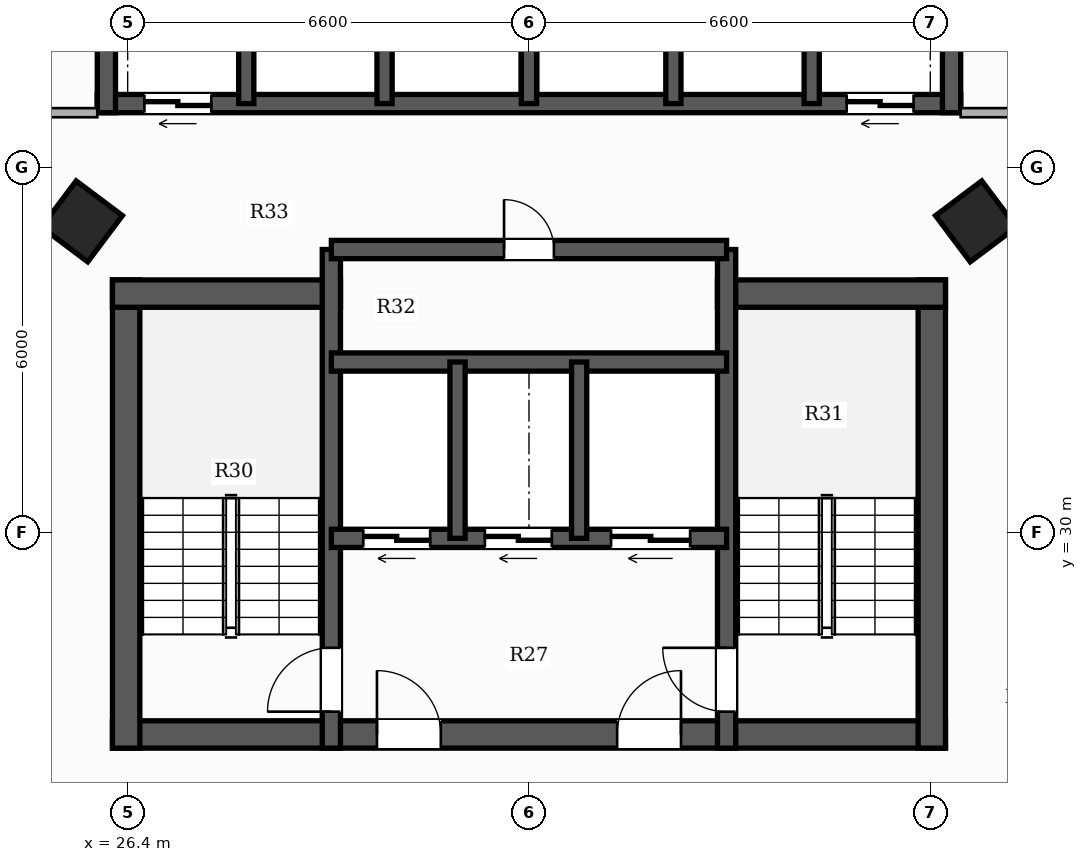
"""IFC4 building model, lengths in metres.
Left out: names, types, materials, properties, quantities, classifications, styles, units other than length and angle.
Written with IfcOpenShell. Run it as: python <this file> out.ifc"""

import sys

from ifc_helpers import new_model, si_unit, direction, frame, frame_2d, origin, origin_2d, place, context, subcontext, project, spatial, rectangle, hollow_rectangle, extrude, element, fill, save


model = new_model("IFC4")
c1 = context("Model", 3, precision=1e-05, world=origin(), true_north=direction((0.0, 1.0)))
c2 = subcontext(c1, "Body", "Model", "MODEL_VIEW")
j1 = project(units=[si_unit("LENGTHUNIT", "METRE"), si_unit("PLANEANGLEUNIT", "RADIAN")], contexts=[c1])
p1 = place(None, origin())
s1 = spatial("IfcSite", under=j1, at=p1, CompositionType="ELEMENT")
p2 = place(p1, origin())
s2 = spatial("IfcBuilding", under=s1, at=p2, CompositionType="ELEMENT")
p3 = place(p2, frame((0.0, 0.0, 26.9)))
s3 = spatial("IfcBuildingStorey", under=s2, at=p3, CompositionType="ELEMENT", Elevation=26.9)
p4 = place(p3, frame((26.15, 26.675, 0.0), z_axis=(0.0, 0.0, 1.0), x_axis=(1.0, 0.0, 0.0)))
e1 = element("IfcWall", 1, at=p4, inside=s3, PredefinedType="SHEAR", context=c2, shape_type="SweptSolid", body=[
    extrude(rectangle(XDim=13.7, YDim=0.45, at=frame_2d((6.85, 0.0))), origin(), (0.0, 0.0, 1.0), 3.3),
])
p5 = place(p4, frame((4.35, 0.0, 0.0)))
e2 = element("IfcOpeningElement", 2, at=p5, cuts=e1, PredefinedType="OPENING", context=c2, shape_type="SweptSolid", body=[
    extrude(rectangle(XDim=1.05, YDim=2.15, at=frame_2d((0.525, 1.075))), frame((0.0, 0.235, 0.0), z_axis=(0.0, -1.0, 0.0), x_axis=(1.0, 0.0, 0.0)), (0.0, 0.0, 1.0), 0.47),
])
p6 = place(p4, frame((8.3, 0.0, 0.0)))
e3 = element("IfcOpeningElement", 3, at=p6, cuts=e1, PredefinedType="OPENING", context=c2, shape_type="SweptSolid", body=[
    extrude(rectangle(XDim=1.05, YDim=2.15, at=frame_2d((0.525, 1.075))), frame((0.0, 0.235, 0.0), z_axis=(0.0, -1.0, 0.0), x_axis=(1.0, 0.0, 0.0)), (0.0, 0.0, 1.0), 0.47),
])
p7 = place(p3, frame((26.375, 26.45, 0.0), z_axis=(0.0, 0.0, 1.0), x_axis=(0.0, 1.0, 0.0)))
e4 = element("IfcWall", 4, at=p7, inside=s3, PredefinedType="SHEAR", context=c2, shape_type="SweptSolid", body=[
    extrude(rectangle(XDim=7.7, YDim=0.45, at=frame_2d((3.85, 0.0))), origin(), (0.0, 0.0, 1.0), 3.3),
])
p8 = place(p3, frame((26.15, 33.925, 0.0), z_axis=(0.0, 0.0, 1.0), x_axis=(1.0, 0.0, 0.0)))
e5 = element("IfcWall", 5, at=p8, inside=s3, PredefinedType="SHEAR", context=c2, shape_type="SweptSolid", body=[
    extrude(rectangle(XDim=3.75, YDim=0.45, at=frame_2d((1.875, 0.0))), origin(), (0.0, 0.0, 1.0), 3.3),
])
p9 = place(p3, frame((39.625, 26.45, 0.0), z_axis=(0.0, 0.0, 1.0), x_axis=(0.0, 1.0, 0.0)))
e6 = element("IfcWall", 6, at=p9, inside=s3, PredefinedType="SHEAR", context=c2, shape_type="SweptSolid", body=[
    extrude(rectangle(XDim=7.7, YDim=0.45, at=frame_2d((3.85, 0.0))), origin(), (0.0, 0.0, 1.0), 3.3),
])
p10 = place(p3, frame((36.1, 33.925, 0.0), z_axis=(0.0, 0.0, 1.0), x_axis=(1.0, 0.0, 0.0)))
e7 = element("IfcWall", 7, at=p10, inside=s3, PredefinedType="SHEAR", context=c2, shape_type="SweptSolid", body=[
    extrude(rectangle(XDim=3.75, YDim=0.45, at=frame_2d((1.875, 0.0))), origin(), (0.0, 0.0, 1.0), 3.3),
])
p11 = place(p3, frame((29.75, 26.45, 0.0), z_axis=(0.0, 0.0, 1.0), x_axis=(0.0, 1.0, 0.0)))
e8 = element("IfcWall", 8, at=p11, inside=s3, PredefinedType="SHEAR", context=c2, shape_type="SweptSolid", body=[
    extrude(rectangle(XDim=8.2, YDim=0.3, at=frame_2d((4.1, 0.0))), origin(), (0.0, 0.0, 1.0), 3.3),
])
p12 = place(p11, frame((0.6, 0.0, 0.0)))
e9 = element("IfcOpeningElement", 9, at=p12, cuts=e8, PredefinedType="OPENING", context=c2, shape_type="SweptSolid", body=[
    extrude(rectangle(XDim=1.05, YDim=2.15, at=frame_2d((0.525, 1.075))), frame((0.0, 0.16, 0.0), z_axis=(0.0, -1.0, 0.0), x_axis=(1.0, 0.0, 0.0)), (0.0, 0.0, 1.0), 0.32),
])
p13 = place(p3, frame((36.25, 26.45, 0.0), z_axis=(0.0, 0.0, 1.0), x_axis=(0.0, 1.0, 0.0)))
e10 = element("IfcWall", 10, at=p13, inside=s3, PredefinedType="SHEAR", context=c2, shape_type="SweptSolid", body=[
    extrude(rectangle(XDim=8.2, YDim=0.3, at=frame_2d((4.1, 0.0))), origin(), (0.0, 0.0, 1.0), 3.3),
])
p14 = place(p13, frame((0.6, 0.0, 0.0)))
e11 = element("IfcOpeningElement", 11, at=p14, cuts=e10, PredefinedType="OPENING", context=c2, shape_type="SweptSolid", body=[
    extrude(rectangle(XDim=1.05, YDim=2.15, at=frame_2d((0.525, 1.075))), frame((0.0, 0.16, 0.0), z_axis=(0.0, -1.0, 0.0), x_axis=(1.0, 0.0, 0.0)), (0.0, 0.0, 1.0), 0.32),
])
p15 = place(p3, frame((36.25, 29.9, 0.0), z_axis=(0.0, 0.0, 1.0), x_axis=(-1.0, 0.0, 0.0)))
e12 = element("IfcWall", 12, at=p15, inside=s3, PredefinedType="SHEAR", context=c2, shape_type="SweptSolid", body=[
    extrude(rectangle(XDim=6.5, YDim=0.3, at=frame_2d((3.25, 0.0))), origin(), (0.0, 0.0, 1.0), 3.3),
])
p16 = place(p15, frame((4.875, 0.0, 0.0)))
e13 = element("IfcOpeningElement", 13, at=p16, cuts=e12, PredefinedType="OPENING", context=c2, shape_type="SweptSolid", body=[
    extrude(rectangle(XDim=1.1, YDim=2.2, at=frame_2d((0.55, 1.1))), frame((0.0, 0.16, 0.0), z_axis=(0.0, -1.0, 0.0), x_axis=(1.0, 0.0, 0.0)), (0.0, 0.0, 1.0), 0.32),
])
p17 = place(p15, frame((2.875, 0.0, 0.0)))
e14 = element("IfcOpeningElement", 14, at=p17, cuts=e12, PredefinedType="OPENING", context=c2, shape_type="SweptSolid", body=[
    extrude(rectangle(XDim=1.1, YDim=2.2, at=frame_2d((0.55, 1.1))), frame((0.0, 0.16, 0.0), z_axis=(0.0, -1.0, 0.0), x_axis=(1.0, 0.0, 0.0)), (0.0, 0.0, 1.0), 0.32),
])
p18 = place(p15, frame((0.6, 0.0, 0.0)))
e15 = element("IfcOpeningElement", 15, at=p18, cuts=e12, PredefinedType="OPENING", context=c2, shape_type="SweptSolid", body=[
    extrude(rectangle(XDim=1.3, YDim=2.2, at=frame_2d((0.65, 1.1))), frame((0.0, 0.16, 0.0), z_axis=(0.0, -1.0, 0.0), x_axis=(1.0, 0.0, 0.0)), (0.0, 0.0, 1.0), 0.32),
])
p19 = place(p3, frame((29.75, 32.8, 0.0), z_axis=(0.0, 0.0, 1.0), x_axis=(1.0, 0.0, 0.0)))
e16 = element("IfcWall", 16, at=p19, inside=s3, PredefinedType="SHEAR", context=c2, shape_type="SweptSolid", body=[
    extrude(rectangle(XDim=6.5, YDim=0.3, at=frame_2d((3.25, 0.0))), origin(), (0.0, 0.0, 1.0), 3.3),
])
for number, where, z_axis, x_axis in (
    (17, (31.825, 29.9, 0.0), (0.0, 0.0, 1.0), (0.0, 1.0, 0.0)),
    (18, (33.825, 29.9, 0.0), (0.0, 0.0, 1.0), (0.0, 1.0, 0.0)),
):
    element("IfcWall", number, at=place(p3, frame(where, z_axis=z_axis, x_axis=x_axis)), inside=s3, PredefinedType="SHEAR", context=c2, shape_type="SweptSolid", body=[
        extrude(rectangle(XDim=2.9, YDim=0.25, at=frame_2d((1.45, 0.0))), origin(), (0.0, 0.0, 1.0), 3.3),
    ])
p20 = place(p3, frame((29.75, 34.65, 0.0), z_axis=(0.0, 0.0, 1.0), x_axis=(1.0, 0.0, 0.0)))
e19 = element("IfcWall", 19, at=p20, inside=s3, PredefinedType="SHEAR", context=c2, shape_type="SweptSolid", body=[
    extrude(rectangle(XDim=6.5, YDim=0.3, at=frame_2d((3.25, 0.0))), origin(), (0.0, 0.0, 1.0), 3.3),
])
p21 = place(p20, frame((2.84, 0.0, 0.0)))
e20 = element("IfcOpeningElement", 20, at=p21, cuts=e19, PredefinedType="OPENING", context=c2, shape_type="SweptSolid", body=[
    extrude(rectangle(XDim=0.82, YDim=2.1, at=frame_2d((0.41, 1.05))), frame((0.0, 0.16, 0.0), z_axis=(0.0, -1.0, 0.0), x_axis=(1.0, 0.0, 0.0)), (0.0, 0.0, 1.0), 0.32),
])
p22 = place(p3, frame((40.1, 37.05, 0.0), z_axis=(0.0, 0.0, 1.0), x_axis=(-1.0, 0.0, 0.0)))
e21 = element("IfcWall", 21, at=p22, inside=s3, PredefinedType="SHEAR", context=c2, shape_type="SweptSolid", body=[
    extrude(rectangle(XDim=14.2, YDim=0.3, at=frame_2d((7.1, 0.0))), origin(), (0.0, 0.0, 1.0), 3.3),
])
p23 = place(p22, frame((12.325, 0.0, 0.0)))
e22 = element("IfcOpeningElement", 22, at=p23, cuts=e21, PredefinedType="OPENING", context=c2, shape_type="SweptSolid", body=[
    extrude(rectangle(XDim=1.1, YDim=2.2, at=frame_2d((0.55, 1.1))), frame((0.0, 0.16, 0.0), z_axis=(0.0, -1.0, 0.0), x_axis=(1.0, 0.0, 0.0)), (0.0, 0.0, 1.0), 0.32),
])
p24 = place(p22, frame((0.775, 0.0, 0.0)))
e23 = element("IfcOpeningElement", 23, at=p24, cuts=e21, PredefinedType="OPENING", context=c2, shape_type="SweptSolid", body=[
    extrude(rectangle(XDim=1.1, YDim=2.2, at=frame_2d((0.55, 1.1))), frame((0.0, 0.16, 0.0), z_axis=(0.0, -1.0, 0.0), x_axis=(1.0, 0.0, 0.0)), (0.0, 0.0, 1.0), 0.32),
])
for number, where, z_axis, x_axis in (
    (24, (26.05, 36.9, 0.0), (0.0, 0.0, 1.0), (0.0, 1.0, 0.0)),
    (25, (39.95, 36.9, 0.0), (0.0, 0.0, 1.0), (0.0, 1.0, 0.0)),
):
    element("IfcWall", number, at=place(p3, frame(where, z_axis=z_axis, x_axis=x_axis)), inside=s3, PredefinedType="SHEAR", context=c2, shape_type="SweptSolid", body=[
        extrude(rectangle(XDim=2.85, YDim=0.3, at=frame_2d((1.425, 0.0))), origin(), (0.0, 0.0, 1.0), 3.3),
    ])
for number, where, z_axis, x_axis in (
    (26, (28.35, 37.05, 0.0), (0.0, 0.0, 1.0), (0.0, 1.0, 0.0)),
    (27, (30.625, 37.05, 0.0), (0.0, 0.0, 1.0), (0.0, 1.0, 0.0)),
    (28, (33.0, 37.05, 0.0), (0.0, 0.0, 1.0), (0.0, 1.0, 0.0)),
    (29, (35.375, 37.05, 0.0), (0.0, 0.0, 1.0), (0.0, 1.0, 0.0)),
    (30, (37.65, 37.05, 0.0), (0.0, 0.0, 1.0), (0.0, 1.0, 0.0)),
):
    element("IfcWall", number, at=place(p3, frame(where, z_axis=z_axis, x_axis=x_axis)), inside=s3, PredefinedType="SHEAR", context=c2, shape_type="SweptSolid", body=[
        extrude(rectangle(XDim=2.55, YDim=0.25, at=frame_2d((1.275, 0.0))), origin(), (0.0, 0.0, 1.0), 3.3),
    ])
for number, where, z_axis, x_axis in (
    (31, (25.648, 35.113, 0.0), (0.0, 0.0, 1.0), (0.6, 0.8, 0.0)),
    (32, (40.352, 35.113, 0.0), (0.0, 0.0, 1.0), (-0.6, 0.8, 0.0)),
):
    element("IfcColumn", number, at=place(p3, frame(where, z_axis=z_axis, x_axis=x_axis)), inside=s3, PredefinedType="COLUMN", context=c2, shape_type="SweptSolid", body=[
        extrude(hollow_rectangle(XDim=0.95, YDim=0.95, WallThickness=0.032, at=origin_2d()), origin(), (0.0, 0.0, 1.0), 3.3),
    ])
p25 = place(p3, frame((40.1, 36.9, 0.0), z_axis=(0.0, 0.0, 1.0), x_axis=(1.0, 0.0, 0.0)))
e33 = element("IfcWall", 33, at=p25, inside=s3, PredefinedType="PARTITIONING", context=c2, shape_type="SweptSolid", body=[
    extrude(rectangle(XDim=2.55, YDim=0.15, at=frame_2d((1.275, 0.0))), origin(), (0.0, 0.0, 1.0), 2.413),
])
p26 = place(p3, frame((23.41, 36.9, 0.0), z_axis=(0.0, 0.0, 1.0), x_axis=(1.0, 0.0, 0.0)))
e34 = element("IfcWall", 34, at=p26, inside=s3, PredefinedType="PARTITIONING", context=c2, shape_type="SweptSolid", body=[
    extrude(rectangle(XDim=2.49, YDim=0.15, at=frame_2d((1.245, 0.0))), origin(), (0.0, 0.0, 1.0), 2.413),
])
p27 = place(p12, origin())
e35 = element("IfcDoor", 35, at=p27, inside=s3, OperationType="SINGLE_SWING_LEFT", PredefinedType="DOOR", context=c2, shape_type="SweptSolid", body=[
    extrude(rectangle(XDim=1.05, YDim=2.15, at=frame_2d((0.525, 1.075))), frame((0.0, 0.025, 0.0), z_axis=(0.0, -1.0, 0.0), x_axis=(1.0, 0.0, 0.0)), (0.0, 0.0, 1.0), 0.05),
])
fill(e9, e35)
p28 = place(p14, origin())
e36 = element("IfcDoor", 36, at=p28, inside=s3, OperationType="SINGLE_SWING_RIGHT", PredefinedType="DOOR", context=c2, shape_type="SweptSolid", body=[
    extrude(rectangle(XDim=1.05, YDim=2.15, at=frame_2d((0.525, 1.075))), frame((0.0, 0.025, 0.0), z_axis=(0.0, -1.0, 0.0), x_axis=(1.0, 0.0, 0.0)), (0.0, 0.0, 1.0), 0.05),
])
fill(e11, e36)
p29 = place(p5, origin())
e37 = element("IfcDoor", 37, at=p29, inside=s3, OperationType="SINGLE_SWING_LEFT", PredefinedType="DOOR", context=c2, shape_type="SweptSolid", body=[
    extrude(rectangle(XDim=1.05, YDim=2.15, at=frame_2d((0.525, 1.075))), frame((0.0, 0.025, 0.0), z_axis=(0.0, -1.0, 0.0), x_axis=(1.0, 0.0, 0.0)), (0.0, 0.0, 1.0), 0.05),
])
fill(e2, e37)
p30 = place(p6, origin())
e38 = element("IfcDoor", 38, at=p30, inside=s3, OperationType="SINGLE_SWING_RIGHT", PredefinedType="DOOR", context=c2, shape_type="SweptSolid", body=[
    extrude(rectangle(XDim=1.05, YDim=2.15, at=frame_2d((0.525, 1.075))), frame((0.0, 0.025, 0.0), z_axis=(0.0, -1.0, 0.0), x_axis=(1.0, 0.0, 0.0)), (0.0, 0.0, 1.0), 0.05),
])
fill(e3, e38)
p31 = place(p16, origin())
e39 = element("IfcDoor", 39, at=p31, inside=s3, OperationType="DOUBLE_DOOR_SLIDING", PredefinedType="DOOR", context=c2, shape_type="SweptSolid", body=[
    extrude(rectangle(XDim=1.1, YDim=2.2, at=frame_2d((0.55, 1.1))), frame((0.0, 0.025, 0.0), z_axis=(0.0, -1.0, 0.0), x_axis=(1.0, 0.0, 0.0)), (0.0, 0.0, 1.0), 0.05),
])
fill(e13, e39)
p32 = place(p17, origin())
e40 = element("IfcDoor", 40, at=p32, inside=s3, OperationType="DOUBLE_DOOR_SLIDING", PredefinedType="DOOR", context=c2, shape_type="SweptSolid", body=[
    extrude(rectangle(XDim=1.1, YDim=2.2, at=frame_2d((0.55, 1.1))), frame((0.0, 0.025, 0.0), z_axis=(0.0, -1.0, 0.0), x_axis=(1.0, 0.0, 0.0)), (0.0, 0.0, 1.0), 0.05),
])
fill(e14, e40)
p33 = place(p18, origin())
e41 = element("IfcDoor", 41, at=p33, inside=s3, OperationType="DOUBLE_DOOR_SLIDING", PredefinedType="DOOR", context=c2, shape_type="SweptSolid", body=[
    extrude(rectangle(XDim=1.3, YDim=2.2, at=frame_2d((0.65, 1.1))), frame((0.0, 0.025, 0.0), z_axis=(0.0, -1.0, 0.0), x_axis=(1.0, 0.0, 0.0)), (0.0, 0.0, 1.0), 0.05),
])
fill(e15, e41)
p34 = place(p23, origin())
e42 = element("IfcDoor", 42, at=p34, inside=s3, OperationType="DOUBLE_DOOR_SLIDING", PredefinedType="DOOR", context=c2, shape_type="SweptSolid", body=[
    extrude(rectangle(XDim=1.1, YDim=2.2, at=frame_2d((0.55, 1.1))), frame((0.0, 0.025, 0.0), z_axis=(0.0, -1.0, 0.0), x_axis=(1.0, 0.0, 0.0)), (0.0, 0.0, 1.0), 0.05),
])
fill(e22, e42)
p35 = place(p24, origin())
e43 = element("IfcDoor", 43, at=p35, inside=s3, OperationType="DOUBLE_DOOR_SLIDING", PredefinedType="DOOR", context=c2, shape_type="SweptSolid", body=[
    extrude(rectangle(XDim=1.1, YDim=2.2, at=frame_2d((0.55, 1.1))), frame((0.0, 0.025, 0.0), z_axis=(0.0, -1.0, 0.0), x_axis=(1.0, 0.0, 0.0)), (0.0, 0.0, 1.0), 0.05),
])
fill(e23, e43)
p36 = place(p21, origin())
e44 = element("IfcDoor", 44, at=p36, inside=s3, OperationType="SINGLE_SWING_LEFT", PredefinedType="DOOR", context=c2, shape_type="SweptSolid", body=[
    extrude(rectangle(XDim=0.82, YDim=2.1, at=frame_2d((0.41, 1.05))), frame((0.0, 0.025, 0.0), z_axis=(0.0, -1.0, 0.0), x_axis=(1.0, 0.0, 0.0)), (0.0, 0.0, 1.0), 0.05),
])
fill(e20, e44)
save(model, sys.argv[1])
